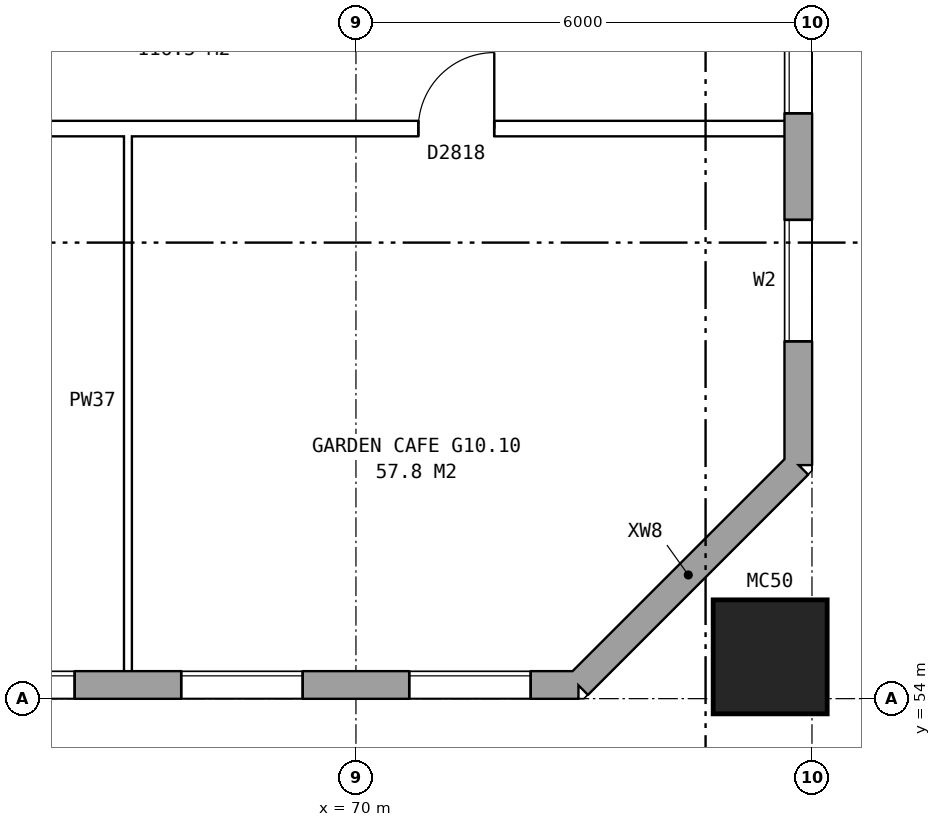
"""IFC4 building model, lengths in metres.
Left out: names, types, materials, properties, quantities, classifications, styles, units other than length and angle.
Written with IfcOpenShell. Run it as: python <this file> out.ifc"""

import sys

from ifc_helpers import new_model, si_unit, direction, frame, frame_2d, origin, origin_2d, place, context, subcontext, project, spatial, rectangle, hollow_rectangle, extrude, element, fill, save


model = new_model("IFC4")
c1 = context("Model", 3, precision=1e-05, world=origin(), true_north=direction((0.0, 1.0)))
c2 = subcontext(c1, "Body", "Model", "MODEL_VIEW")
j1 = project(units=[si_unit("LENGTHUNIT", "METRE"), si_unit("PLANEANGLEUNIT", "RADIAN")], contexts=[c1])
p1 = place(None, origin())
s1 = spatial("IfcSite", under=j1, at=p1, CompositionType="ELEMENT")
p2 = place(p1, origin())
s2 = spatial("IfcBuilding", under=s1, at=p2, CompositionType="ELEMENT")
p3 = place(p2, frame((0.0, 0.0, 38.1)))
s3 = spatial("IfcBuildingStorey", under=s2, at=p3, CompositionType="ELEMENT", Elevation=38.1)
p4 = place(p3, frame((75.45, 54.55, 0.0), z_axis=(0.0, 0.0, 1.0), x_axis=(1.0, 0.0, 0.0)))
e1 = element("IfcColumn", 1, at=p4, inside=s3, PredefinedType="COLUMN", context=c2, shape_type="SweptSolid", body=[
    extrude(hollow_rectangle(XDim=1.5, YDim=1.5, WallThickness=0.08, at=origin_2d()), origin(), (0.0, 0.0, 1.0), 6.2),
])
p5 = place(p3, frame((24.575, 54.18, 0.0), z_axis=(0.0, 0.0, 1.0), x_axis=(1.0, 0.0, 0.0)))
e2 = element("IfcWall", 2, at=p5, inside=s3, PredefinedType="STANDARD", context=c2, shape_type="SweptSolid", body=[
    extrude(rectangle(XDim=48.351, YDim=0.36, at=frame_2d((24.175, 0.0))), origin(), (0.0, 0.0, 1.0), 5.6),
])
p6 = place(p5, frame((1.125, 0.0, 0.15)))
e3 = element("IfcOpeningElement", 3, at=p6, cuts=e2, PredefinedType="OPENING", context=c2, shape_type="SweptSolid", body=[
    extrude(rectangle(XDim=1.6, YDim=2.4, at=frame_2d((0.8, 1.2))), frame((0.0, 0.19, 0.0), z_axis=(0.0, -1.0, 0.0), x_axis=(1.0, 0.0, 0.0)), (0.0, 0.0, 1.0), 0.38),
])
p7 = place(p5, frame((4.125, 0.0, 0.15)))
e4 = element("IfcOpeningElement", 4, at=p7, cuts=e2, PredefinedType="OPENING", context=c2, shape_type="SweptSolid", body=[
    extrude(rectangle(XDim=1.6, YDim=2.4, at=frame_2d((0.8, 1.2))), frame((0.0, 0.19, 0.0), z_axis=(0.0, -1.0, 0.0), x_axis=(1.0, 0.0, 0.0)), (0.0, 0.0, 1.0), 0.38),
])
p8 = place(p5, frame((7.125, 0.0, 0.15)))
e5 = element("IfcOpeningElement", 5, at=p8, cuts=e2, PredefinedType="OPENING", context=c2, shape_type="SweptSolid", body=[
    extrude(rectangle(XDim=1.6, YDim=2.4, at=frame_2d((0.8, 1.2))), frame((0.0, 0.19, 0.0), z_axis=(0.0, -1.0, 0.0), x_axis=(1.0, 0.0, 0.0)), (0.0, 0.0, 1.0), 0.38),
])
p9 = place(p5, frame((10.125, 0.0, 0.15)))
e6 = element("IfcOpeningElement", 6, at=p9, cuts=e2, PredefinedType="OPENING", context=c2, shape_type="SweptSolid", body=[
    extrude(rectangle(XDim=1.6, YDim=2.4, at=frame_2d((0.8, 1.2))), frame((0.0, 0.19, 0.0), z_axis=(0.0, -1.0, 0.0), x_axis=(1.0, 0.0, 0.0)), (0.0, 0.0, 1.0), 0.38),
])
p10 = place(p5, frame((13.125, 0.0, 0.15)))
e7 = element("IfcOpeningElement", 7, at=p10, cuts=e2, PredefinedType="OPENING", context=c2, shape_type="SweptSolid", body=[
    extrude(rectangle(XDim=1.6, YDim=2.4, at=frame_2d((0.8, 1.2))), frame((0.0, 0.19, 0.0), z_axis=(0.0, -1.0, 0.0), x_axis=(1.0, 0.0, 0.0)), (0.0, 0.0, 1.0), 0.38),
])
p11 = place(p5, frame((16.125, 0.0, 0.15)))
e8 = element("IfcOpeningElement", 8, at=p11, cuts=e2, PredefinedType="OPENING", context=c2, shape_type="SweptSolid", body=[
    extrude(rectangle(XDim=1.6, YDim=2.4, at=frame_2d((0.8, 1.2))), frame((0.0, 0.19, 0.0), z_axis=(0.0, -1.0, 0.0), x_axis=(1.0, 0.0, 0.0)), (0.0, 0.0, 1.0), 0.38),
])
p12 = place(p5, frame((19.125, 0.0, 0.15)))
e9 = element("IfcOpeningElement", 9, at=p12, cuts=e2, PredefinedType="OPENING", context=c2, shape_type="SweptSolid", body=[
    extrude(rectangle(XDim=1.6, YDim=2.4, at=frame_2d((0.8, 1.2))), frame((0.0, 0.19, 0.0), z_axis=(0.0, -1.0, 0.0), x_axis=(1.0, 0.0, 0.0)), (0.0, 0.0, 1.0), 0.38),
])
p13 = place(p5, frame((22.125, 0.0, 0.15)))
e10 = element("IfcOpeningElement", 10, at=p13, cuts=e2, PredefinedType="OPENING", context=c2, shape_type="SweptSolid", body=[
    extrude(rectangle(XDim=1.6, YDim=2.4, at=frame_2d((0.8, 1.2))), frame((0.0, 0.19, 0.0), z_axis=(0.0, -1.0, 0.0), x_axis=(1.0, 0.0, 0.0)), (0.0, 0.0, 1.0), 0.38),
])
p14 = place(p5, frame((25.125, 0.0, 0.15)))
e11 = element("IfcOpeningElement", 11, at=p14, cuts=e2, PredefinedType="OPENING", context=c2, shape_type="SweptSolid", body=[
    extrude(rectangle(XDim=1.6, YDim=2.4, at=frame_2d((0.8, 1.2))), frame((0.0, 0.19, 0.0), z_axis=(0.0, -1.0, 0.0), x_axis=(1.0, 0.0, 0.0)), (0.0, 0.0, 1.0), 0.38),
])
p15 = place(p5, frame((28.125, 0.0, 0.15)))
e12 = element("IfcOpeningElement", 12, at=p15, cuts=e2, PredefinedType="OPENING", context=c2, shape_type="SweptSolid", body=[
    extrude(rectangle(XDim=1.6, YDim=2.4, at=frame_2d((0.8, 1.2))), frame((0.0, 0.19, 0.0), z_axis=(0.0, -1.0, 0.0), x_axis=(1.0, 0.0, 0.0)), (0.0, 0.0, 1.0), 0.38),
])
p16 = place(p5, frame((31.125, 0.0, 0.15)))
e13 = element("IfcOpeningElement", 13, at=p16, cuts=e2, PredefinedType="OPENING", context=c2, shape_type="SweptSolid", body=[
    extrude(rectangle(XDim=1.6, YDim=2.4, at=frame_2d((0.8, 1.2))), frame((0.0, 0.19, 0.0), z_axis=(0.0, -1.0, 0.0), x_axis=(1.0, 0.0, 0.0)), (0.0, 0.0, 1.0), 0.38),
])
p17 = place(p5, frame((34.125, 0.0, 0.15)))
e14 = element("IfcOpeningElement", 14, at=p17, cuts=e2, PredefinedType="OPENING", context=c2, shape_type="SweptSolid", body=[
    extrude(rectangle(XDim=1.6, YDim=2.4, at=frame_2d((0.8, 1.2))), frame((0.0, 0.19, 0.0), z_axis=(0.0, -1.0, 0.0), x_axis=(1.0, 0.0, 0.0)), (0.0, 0.0, 1.0), 0.38),
])
p18 = place(p5, frame((37.125, 0.0, 0.15)))
e15 = element("IfcOpeningElement", 15, at=p18, cuts=e2, PredefinedType="OPENING", context=c2, shape_type="SweptSolid", body=[
    extrude(rectangle(XDim=1.6, YDim=2.4, at=frame_2d((0.8, 1.2))), frame((0.0, 0.19, 0.0), z_axis=(0.0, -1.0, 0.0), x_axis=(1.0, 0.0, 0.0)), (0.0, 0.0, 1.0), 0.38),
])
p19 = place(p5, frame((40.125, 0.0, 0.15)))
e16 = element("IfcOpeningElement", 16, at=p19, cuts=e2, PredefinedType="OPENING", context=c2, shape_type="SweptSolid", body=[
    extrude(rectangle(XDim=1.6, YDim=2.4, at=frame_2d((0.8, 1.2))), frame((0.0, 0.19, 0.0), z_axis=(0.0, -1.0, 0.0), x_axis=(1.0, 0.0, 0.0)), (0.0, 0.0, 1.0), 0.38),
])
p20 = place(p5, frame((43.125, 0.0, 0.15)))
e17 = element("IfcOpeningElement", 17, at=p20, cuts=e2, PredefinedType="OPENING", context=c2, shape_type="SweptSolid", body=[
    extrude(rectangle(XDim=1.6, YDim=2.4, at=frame_2d((0.8, 1.2))), frame((0.0, 0.19, 0.0), z_axis=(0.0, -1.0, 0.0), x_axis=(1.0, 0.0, 0.0)), (0.0, 0.0, 1.0), 0.38),
])
p21 = place(p5, frame((46.125, 0.0, 0.15)))
e18 = element("IfcOpeningElement", 18, at=p21, cuts=e2, PredefinedType="OPENING", context=c2, shape_type="SweptSolid", body=[
    extrude(rectangle(XDim=1.6, YDim=2.4, at=frame_2d((0.8, 1.2))), frame((0.0, 0.19, 0.0), z_axis=(0.0, -1.0, 0.0), x_axis=(1.0, 0.0, 0.0)), (0.0, 0.0, 1.0), 0.38),
])
p22 = place(p3, frame((72.925, 54.18, 0.0), z_axis=(0.0, 0.0, 1.0), x_axis=(0.707106781187, 0.707106781187, 0.0)))
e19 = element("IfcWall", 19, at=p22, inside=s3, PredefinedType="STANDARD", context=c2, shape_type="SweptSolid", body=[
    extrude(rectangle(XDim=4.094, YDim=0.36, at=frame_2d((2.047, 0.0))), origin(), (0.0, 0.0, 1.0), 5.6),
])
p23 = place(p3, frame((75.82, 57.075, 0.0), z_axis=(0.0, 0.0, 1.0), x_axis=(0.0, 1.0, 0.0)))
e20 = element("IfcWall", 20, at=p23, inside=s3, PredefinedType="STANDARD", context=c2, shape_type="SweptSolid", body=[
    extrude(rectangle(XDim=25.851, YDim=0.36, at=frame_2d((12.925, 0.0))), origin(), (0.0, 0.0, 1.0), 5.6),
])
p24 = place(p23, frame((1.625, 0.0, 0.15)))
e21 = element("IfcOpeningElement", 21, at=p24, cuts=e20, PredefinedType="OPENING", context=c2, shape_type="SweptSolid", body=[
    extrude(rectangle(XDim=1.6, YDim=2.4, at=frame_2d((0.8, 1.2))), frame((0.0, 0.19, 0.0), z_axis=(0.0, -1.0, 0.0), x_axis=(1.0, 0.0, 0.0)), (0.0, 0.0, 1.0), 0.38),
])
p25 = place(p23, frame((4.625, 0.0, 0.15)))
e22 = element("IfcOpeningElement", 22, at=p25, cuts=e20, PredefinedType="OPENING", context=c2, shape_type="SweptSolid", body=[
    extrude(rectangle(XDim=1.6, YDim=2.4, at=frame_2d((0.8, 1.2))), frame((0.0, 0.19, 0.0), z_axis=(0.0, -1.0, 0.0), x_axis=(1.0, 0.0, 0.0)), (0.0, 0.0, 1.0), 0.38),
])
p26 = place(p23, frame((19.625, 0.0, 0.15)))
e23 = element("IfcOpeningElement", 23, at=p26, cuts=e20, PredefinedType="OPENING", context=c2, shape_type="SweptSolid", body=[
    extrude(rectangle(XDim=1.6, YDim=2.4, at=frame_2d((0.8, 1.2))), frame((0.0, 0.19, 0.0), z_axis=(0.0, -1.0, 0.0), x_axis=(1.0, 0.0, 0.0)), (0.0, 0.0, 1.0), 0.38),
])
p27 = place(p23, frame((22.625, 0.0, 0.15)))
e24 = element("IfcOpeningElement", 24, at=p27, cuts=e20, PredefinedType="OPENING", context=c2, shape_type="SweptSolid", body=[
    extrude(rectangle(XDim=1.6, YDim=2.4, at=frame_2d((0.8, 1.2))), frame((0.0, 0.19, 0.0), z_axis=(0.0, -1.0, 0.0), x_axis=(1.0, 0.0, 0.0)), (0.0, 0.0, 1.0), 0.38),
])
p28 = place(p3, frame((24.9, 61.5, 0.0), z_axis=(0.0, 0.0, 1.0), x_axis=(1.0, 0.0, 0.0)))
e25 = element("IfcWall", 25, at=p28, inside=s3, PredefinedType="PARTITIONING", context=c2, shape_type="SweptSolid", body=[
    extrude(rectangle(XDim=50.86, YDim=0.2, at=frame_2d((25.43, 0.0))), origin(), (0.0, 0.0, 1.0), 5.6),
])
p29 = place(p28, frame((1.1, 0.0, 0.0)))
e26 = element("IfcOpeningElement", 26, at=p29, cuts=e25, PredefinedType="OPENING", context=c2, shape_type="SweptSolid", body=[
    extrude(rectangle(XDim=1.0, YDim=2.1, at=frame_2d((0.5, 1.05))), frame((0.0, 0.11, 0.0), z_axis=(0.0, -1.0, 0.0), x_axis=(1.0, 0.0, 0.0)), (0.0, 0.0, 1.0), 0.22),
])
p30 = place(p28, frame((10.1, 0.0, 0.0)))
e27 = element("IfcOpeningElement", 27, at=p30, cuts=e25, PredefinedType="OPENING", context=c2, shape_type="SweptSolid", body=[
    extrude(rectangle(XDim=1.0, YDim=2.1, at=frame_2d((0.5, 1.05))), frame((0.0, 0.11, 0.0), z_axis=(0.0, -1.0, 0.0), x_axis=(1.0, 0.0, 0.0)), (0.0, 0.0, 1.0), 0.22),
])
p31 = place(p28, frame((19.1, 0.0, 0.0)))
e28 = element("IfcOpeningElement", 28, at=p31, cuts=e25, PredefinedType="OPENING", context=c2, shape_type="SweptSolid", body=[
    extrude(rectangle(XDim=1.0, YDim=2.1, at=frame_2d((0.5, 1.05))), frame((0.0, 0.11, 0.0), z_axis=(0.0, -1.0, 0.0), x_axis=(1.0, 0.0, 0.0)), (0.0, 0.0, 1.0), 0.22),
])
p32 = place(p28, frame((25.1, 0.0, 0.0)))
e29 = element("IfcOpeningElement", 29, at=p32, cuts=e25, PredefinedType="OPENING", context=c2, shape_type="SweptSolid", body=[
    extrude(rectangle(XDim=1.0, YDim=2.1, at=frame_2d((0.5, 1.05))), frame((0.0, 0.11, 0.0), z_axis=(0.0, -1.0, 0.0), x_axis=(1.0, 0.0, 0.0)), (0.0, 0.0, 1.0), 0.22),
])
p33 = place(p28, frame((32.6, 0.0, 0.0)))
e30 = element("IfcOpeningElement", 30, at=p33, cuts=e25, PredefinedType="OPENING", context=c2, shape_type="SweptSolid", body=[
    extrude(rectangle(XDim=1.0, YDim=2.1, at=frame_2d((0.5, 1.05))), frame((0.0, 0.11, 0.0), z_axis=(0.0, -1.0, 0.0), x_axis=(1.0, 0.0, 0.0)), (0.0, 0.0, 1.0), 0.22),
])
p34 = place(p28, frame((39.5, 0.0, 0.0)))
e31 = element("IfcOpeningElement", 31, at=p34, cuts=e25, PredefinedType="OPENING", context=c2, shape_type="SweptSolid", body=[
    extrude(rectangle(XDim=1.0, YDim=2.1, at=frame_2d((0.5, 1.05))), frame((0.0, 0.11, 0.0), z_axis=(0.0, -1.0, 0.0), x_axis=(1.0, 0.0, 0.0)), (0.0, 0.0, 1.0), 0.22),
])
p35 = place(p28, frame((45.92, 0.0, 0.0)))
e32 = element("IfcOpeningElement", 32, at=p35, cuts=e25, PredefinedType="OPENING", context=c2, shape_type="SweptSolid", body=[
    extrude(rectangle(XDim=1.0, YDim=2.1, at=frame_2d((0.5, 1.05))), frame((0.0, 0.11, 0.0), z_axis=(0.0, -1.0, 0.0), x_axis=(1.0, 0.0, 0.0)), (0.0, 0.0, 1.0), 0.22),
])
p36 = place(p3, frame((67.0, 54.24, 0.0), z_axis=(0.0, 0.0, 1.0), x_axis=(0.0, 1.0, 0.0)))
e33 = element("IfcWall", 33, at=p36, inside=s3, PredefinedType="PARTITIONING", context=c2, shape_type="SweptSolid", body=[
    extrude(rectangle(XDim=7.36, YDim=0.1, at=frame_2d((3.68, 0.0))), origin(), (0.0, 0.0, 1.0), 5.6),
])
p37 = place(p19, origin())
e34 = element("IfcWindow", 34, at=p37, inside=s3, PartitioningType="SINGLE_PANEL", PredefinedType="WINDOW", context=c2, shape_type="SweptSolid", body=[
    extrude(rectangle(XDim=1.6, YDim=2.4, at=frame_2d((0.8, 1.2))), frame((0.0, 0.15, 0.0), z_axis=(0.0, -1.0, 0.0), x_axis=(1.0, 0.0, 0.0)), (0.0, 0.0, 1.0), 0.06),
])
fill(e16, e34)
p38 = place(p20, origin())
e35 = element("IfcWindow", 35, at=p38, inside=s3, PartitioningType="SINGLE_PANEL", PredefinedType="WINDOW", context=c2, shape_type="SweptSolid", body=[
    extrude(rectangle(XDim=1.6, YDim=2.4, at=frame_2d((0.8, 1.2))), frame((0.0, 0.15, 0.0), z_axis=(0.0, -1.0, 0.0), x_axis=(1.0, 0.0, 0.0)), (0.0, 0.0, 1.0), 0.06),
])
fill(e17, e35)
p39 = place(p21, origin())
e36 = element("IfcWindow", 36, at=p39, inside=s3, PartitioningType="SINGLE_PANEL", PredefinedType="WINDOW", context=c2, shape_type="SweptSolid", body=[
    extrude(rectangle(XDim=1.6, YDim=2.4, at=frame_2d((0.8, 1.2))), frame((0.0, 0.15, 0.0), z_axis=(0.0, -1.0, 0.0), x_axis=(1.0, 0.0, 0.0)), (0.0, 0.0, 1.0), 0.06),
])
fill(e18, e36)
p40 = place(p24, origin())
e37 = element("IfcWindow", 37, at=p40, inside=s3, PartitioningType="SINGLE_PANEL", PredefinedType="WINDOW", context=c2, shape_type="SweptSolid", body=[
    extrude(rectangle(XDim=1.6, YDim=2.4, at=frame_2d((0.8, 1.2))), frame((0.0, 0.15, 0.0), z_axis=(0.0, -1.0, 0.0), x_axis=(1.0, 0.0, 0.0)), (0.0, 0.0, 1.0), 0.06),
])
fill(e21, e37)
p41 = place(p25, origin())
e38 = element("IfcWindow", 38, at=p41, inside=s3, PartitioningType="SINGLE_PANEL", PredefinedType="WINDOW", context=c2, shape_type="SweptSolid", body=[
    extrude(rectangle(XDim=1.6, YDim=2.4, at=frame_2d((0.8, 1.2))), frame((0.0, 0.15, 0.0), z_axis=(0.0, -1.0, 0.0), x_axis=(1.0, 0.0, 0.0)), (0.0, 0.0, 1.0), 0.06),
])
fill(e22, e38)
p42 = place(p35, origin())
e39 = element("IfcDoor", 39, at=p42, inside=s3, OperationType="SINGLE_SWING_RIGHT", PredefinedType="DOOR", context=c2, shape_type="SweptSolid", body=[
    extrude(rectangle(XDim=1.0, YDim=2.1, at=frame_2d((0.5, 1.05))), frame((0.0, 0.025, 0.0), z_axis=(0.0, -1.0, 0.0), x_axis=(1.0, 0.0, 0.0)), (0.0, 0.0, 1.0), 0.05),
])
fill(e32, e39)
save(model, sys.argv[1])
